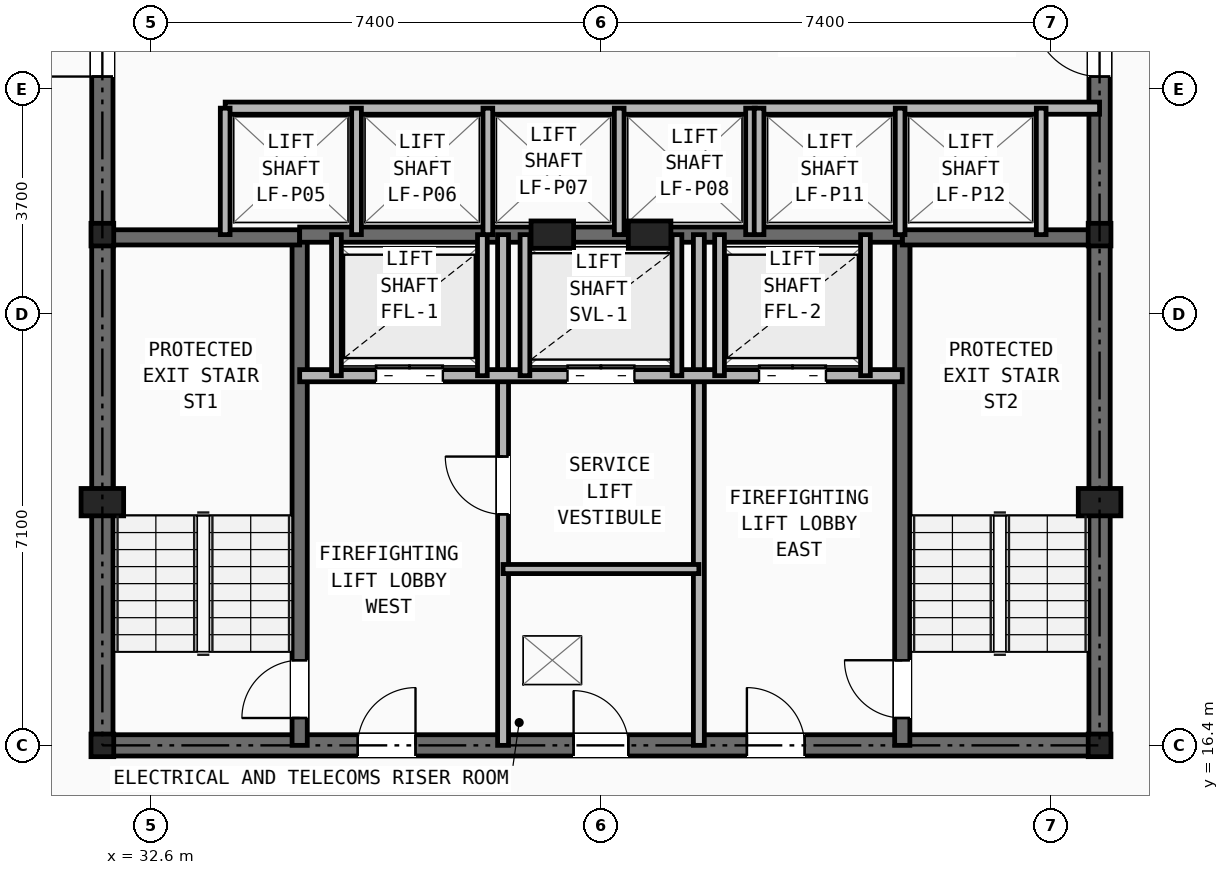
"""IFC4 building model, lengths in metres.
Left out: names, types, materials, properties, quantities, classifications, styles, units other than length and angle.
Written with IfcOpenShell. Run it as: python <this file> out.ifc"""

import sys

from ifc_helpers import new_model, si_unit, direction, frame, frame_2d, origin, origin_2d, place, context, subcontext, project, spatial, rectangle, i_section, extrude, element, fill, save


model = new_model("IFC4")
c1 = context("Model", 3, precision=1e-05, world=origin(), true_north=direction((0.0, 1.0)))
c2 = subcontext(c1, "Body", "Model", "MODEL_VIEW")
j1 = project(units=[si_unit("LENGTHUNIT", "METRE"), si_unit("PLANEANGLEUNIT", "RADIAN")], contexts=[c1])
p1 = place(None, origin())
s1 = spatial("IfcSite", under=j1, at=p1, CompositionType="ELEMENT")
p2 = place(p1, origin())
s2 = spatial("IfcBuilding", under=s1, at=p2, CompositionType="ELEMENT")
p3 = place(p2, frame((0.0, 0.0, 62.4)))
s3 = spatial("IfcBuildingStorey", under=s2, at=p3, CompositionType="ELEMENT", Elevation=62.4)
for number, where, z_axis, x_axis in (
    (1, (31.8, 16.4, 0.0), (0.0, 0.0, 1.0), (1.0, 0.0, 0.0)),
    (2, (48.2, 16.4, 0.0), (0.0, 0.0, 1.0), (1.0, 0.0, 0.0)),
    (3, (31.8, 24.8, 0.0), (0.0, 0.0, 1.0), (1.0, 0.0, 0.0)),
    (4, (48.2, 24.8, 0.0), (0.0, 0.0, 1.0), (1.0, 0.0, 0.0)),
):
    element("IfcColumn", number, at=place(p3, frame(where, z_axis=z_axis, x_axis=x_axis)), inside=s3, PredefinedType="COLUMN", context=c2, shape_type="SweptSolid", body=[
        extrude(i_section(OverallWidth=0.374, OverallDepth=0.372, WebThickness=0.016, FlangeThickness=0.026, at=origin_2d()), origin(), (0.0, 0.0, 1.0), 3.2),
    ])
for number, where, z_axis, x_axis in (
    (5, (31.8, 20.4, 0.0), (0.0, 0.0, 1.0), (1.0, 0.0, 0.0)),
    (6, (48.2, 20.4, 0.0), (0.0, 0.0, 1.0), (1.0, 0.0, 0.0)),
    (7, (39.2, 24.8, 0.0), (0.0, 0.0, 1.0), (1.0, 0.0, 0.0)),
    (8, (40.8, 24.8, 0.0), (0.0, 0.0, 1.0), (1.0, 0.0, 0.0)),
):
    element("IfcColumn", number, at=place(p3, frame(where, z_axis=z_axis, x_axis=x_axis)), inside=s3, PredefinedType="PILASTER", context=c2, shape_type="SweptSolid", body=[
        extrude(rectangle(XDim=0.7, YDim=0.45, at=origin_2d()), origin(), (0.0, 0.0, 1.0), 3.2),
    ])
p4 = place(p3, frame((31.8, 16.4, 0.0), z_axis=(0.0, 0.0, 1.0), x_axis=(1.0, 0.0, 0.0)))
e9 = element("IfcWall", 9, at=p4, inside=s3, PredefinedType="SHEAR", context=c2, shape_type="SweptSolid", body=[
    extrude(rectangle(XDim=16.4, YDim=0.35, at=frame_2d((8.2, 0.0))), origin(), (0.0, 0.0, 1.0), 2.98),
])
p5 = place(p4, frame((7.75, 0.0, 0.0)))
e10 = element("IfcOpeningElement", 10, at=p5, cuts=e9, PredefinedType="OPENING", context=c2, shape_type="SweptSolid", body=[
    extrude(rectangle(XDim=0.9, YDim=2.1, at=frame_2d((0.45, 1.05))), frame((0.0, 0.185, 0.0), z_axis=(0.0, -1.0, 0.0), x_axis=(1.0, 0.0, 0.0)), (0.0, 0.0, 1.0), 0.37),
])
p6 = place(p4, frame((4.2, 0.0, 0.0)))
e11 = element("IfcOpeningElement", 11, at=p6, cuts=e9, PredefinedType="OPENING", context=c2, shape_type="SweptSolid", body=[
    extrude(rectangle(XDim=0.95, YDim=2.1, at=frame_2d((0.475, 1.05))), frame((0.0, 0.185, 0.0), z_axis=(0.0, -1.0, 0.0), x_axis=(1.0, 0.0, 0.0)), (0.0, 0.0, 1.0), 0.37),
])
p7 = place(p4, frame((10.6, 0.0, 0.0)))
e12 = element("IfcOpeningElement", 12, at=p7, cuts=e9, PredefinedType="OPENING", context=c2, shape_type="SweptSolid", body=[
    extrude(rectangle(XDim=0.95, YDim=2.1, at=frame_2d((0.475, 1.05))), frame((0.0, 0.185, 0.0), z_axis=(0.0, -1.0, 0.0), x_axis=(1.0, 0.0, 0.0)), (0.0, 0.0, 1.0), 0.37),
])
p8 = place(p3, frame((31.8, 16.4, 0.0), z_axis=(0.0, 0.0, 1.0), x_axis=(0.0, 1.0, 0.0)))
e13 = element("IfcWall", 13, at=p8, inside=s3, PredefinedType="SHEAR", context=c2, shape_type="SweptSolid", body=[
    extrude(rectangle(XDim=14.8, YDim=0.35, at=frame_2d((7.4, 0.0))), origin(), (0.0, 0.0, 1.0), 2.98),
])
p9 = place(p8, frame((11.0, 0.0, 0.0)))
e14 = element("IfcOpeningElement", 14, at=p9, cuts=e13, PredefinedType="OPENING", context=c2, shape_type="SweptSolid", body=[
    extrude(rectangle(XDim=1.1, YDim=2.15, at=frame_2d((0.55, 1.075))), frame((0.0, 0.185, 0.0), z_axis=(0.0, -1.0, 0.0), x_axis=(1.0, 0.0, 0.0)), (0.0, 0.0, 1.0), 0.37),
])
p10 = place(p3, frame((48.2, 16.4, 0.0), z_axis=(0.0, 0.0, 1.0), x_axis=(0.0, 1.0, 0.0)))
e15 = element("IfcWall", 15, at=p10, inside=s3, PredefinedType="SHEAR", context=c2, shape_type="SweptSolid", body=[
    extrude(rectangle(XDim=14.8, YDim=0.35, at=frame_2d((7.4, 0.0))), origin(), (0.0, 0.0, 1.0), 2.98),
])
p11 = place(p10, frame((11.0, 0.0, 0.0)))
e16 = element("IfcOpeningElement", 16, at=p11, cuts=e15, PredefinedType="OPENING", context=c2, shape_type="SweptSolid", body=[
    extrude(rectangle(XDim=1.1, YDim=2.15, at=frame_2d((0.55, 1.075))), frame((0.0, 0.185, 0.0), z_axis=(0.0, -1.0, 0.0), x_axis=(1.0, 0.0, 0.0)), (0.0, 0.0, 1.0), 0.37),
])
p12 = place(p3, frame((35.045, 16.4, 0.0), z_axis=(0.0, 0.0, 1.0), x_axis=(0.0, 1.0, 0.0)))
e17 = element("IfcWall", 17, at=p12, inside=s3, PredefinedType="SHEAR", context=c2, shape_type="SweptSolid", body=[
    extrude(rectangle(XDim=8.4, YDim=0.25, at=frame_2d((4.2, 0.0))), origin(), (0.0, 0.0, 1.0), 2.98),
])
p13 = place(p12, frame((0.45, 0.0, 0.0)))
e18 = element("IfcOpeningElement", 18, at=p13, cuts=e17, PredefinedType="OPENING", context=c2, shape_type="SweptSolid", body=[
    extrude(rectangle(XDim=0.95, YDim=2.1, at=frame_2d((0.475, 1.05))), frame((0.0, 0.135, 0.0), z_axis=(0.0, -1.0, 0.0), x_axis=(1.0, 0.0, 0.0)), (0.0, 0.0, 1.0), 0.27),
])
p14 = place(p3, frame((31.8, 24.755, 0.0), z_axis=(0.0, 0.0, 1.0), x_axis=(1.0, 0.0, 0.0)))
e19 = element("IfcWall", 19, at=p14, inside=s3, PredefinedType="SHEAR", context=c2, shape_type="SweptSolid", body=[
    extrude(rectangle(XDim=3.245, YDim=0.25, at=frame_2d((1.623, 0.0))), origin(), (0.0, 0.0, 1.0), 2.98),
])
p15 = place(p3, frame((44.955, 16.4, 0.0), z_axis=(0.0, 0.0, 1.0), x_axis=(0.0, 1.0, 0.0)))
e20 = element("IfcWall", 20, at=p15, inside=s3, PredefinedType="SHEAR", context=c2, shape_type="SweptSolid", body=[
    extrude(rectangle(XDim=8.4, YDim=0.25, at=frame_2d((4.2, 0.0))), origin(), (0.0, 0.0, 1.0), 2.98),
])
p16 = place(p15, frame((0.45, 0.0, 0.0)))
e21 = element("IfcOpeningElement", 21, at=p16, cuts=e20, PredefinedType="OPENING", context=c2, shape_type="SweptSolid", body=[
    extrude(rectangle(XDim=0.95, YDim=2.1, at=frame_2d((0.475, 1.05))), frame((0.0, 0.135, 0.0), z_axis=(0.0, -1.0, 0.0), x_axis=(1.0, 0.0, 0.0)), (0.0, 0.0, 1.0), 0.27),
])
p17 = place(p3, frame((44.955, 24.755, 0.0), z_axis=(0.0, 0.0, 1.0), x_axis=(1.0, 0.0, 0.0)))
e22 = element("IfcWall", 22, at=p17, inside=s3, PredefinedType="SHEAR", context=c2, shape_type="SweptSolid", body=[
    extrude(rectangle(XDim=3.245, YDim=0.25, at=frame_2d((1.623, 0.0))), origin(), (0.0, 0.0, 1.0), 2.98),
])
p18 = place(p3, frame((35.045, 24.8, 0.0), z_axis=(0.0, 0.0, 1.0), x_axis=(1.0, 0.0, 0.0)))
e23 = element("IfcWall", 23, at=p18, inside=s3, PredefinedType="SHEAR", context=c2, shape_type="SweptSolid", body=[
    extrude(rectangle(XDim=9.91, YDim=0.25, at=frame_2d((4.955, 0.0))), origin(), (0.0, 0.0, 1.0), 2.98),
])
p19 = place(p3, frame((38.39, 16.4, 0.0), z_axis=(0.0, 0.0, 1.0), x_axis=(0.0, 1.0, 0.0)))
e24 = element("IfcWall", 24, at=p19, inside=s3, PredefinedType="PARTITIONING", context=c2, shape_type="SweptSolid", body=[
    extrude(rectangle(XDim=8.4, YDim=0.18, at=frame_2d((4.2, 0.0))), origin(), (0.0, 0.0, 1.0), 2.431),
])
p20 = place(p19, frame((3.8, 0.0, 0.0)))
e25 = element("IfcOpeningElement", 25, at=p20, cuts=e24, PredefinedType="OPENING", context=c2, shape_type="SweptSolid", body=[
    extrude(rectangle(XDim=0.95, YDim=2.1, at=frame_2d((0.475, 1.05))), frame((0.0, 0.1, 0.0), z_axis=(0.0, -1.0, 0.0), x_axis=(1.0, 0.0, 0.0)), (0.0, 0.0, 1.0), 0.2),
])
p21 = place(p3, frame((41.61, 16.4, 0.0), z_axis=(0.0, 0.0, 1.0), x_axis=(0.0, 1.0, 0.0)))
e26 = element("IfcWall", 26, at=p21, inside=s3, PredefinedType="PARTITIONING", context=c2, shape_type="SweptSolid", body=[
    extrude(rectangle(XDim=8.4, YDim=0.18, at=frame_2d((4.2, 0.0))), origin(), (0.0, 0.0, 1.0), 2.431),
])
p22 = place(p3, frame((35.045, 22.48, 0.0), z_axis=(0.0, 0.0, 1.0), x_axis=(1.0, 0.0, 0.0)))
e27 = element("IfcWall", 27, at=p22, inside=s3, PredefinedType="SOLIDWALL", context=c2, shape_type="SweptSolid", body=[
    extrude(rectangle(XDim=9.91, YDim=0.2, at=frame_2d((4.955, 0.0))), origin(), (0.0, 0.0, 1.0), 2.98),
])
p23 = place(p22, frame((1.255, 0.0, 0.0)))
e28 = element("IfcOpeningElement", 28, at=p23, cuts=e27, PredefinedType="OPENING", context=c2, shape_type="SweptSolid", body=[
    extrude(rectangle(XDim=1.1, YDim=2.15, at=frame_2d((0.55, 1.075))), frame((0.0, 0.11, 0.0), z_axis=(0.0, -1.0, 0.0), x_axis=(1.0, 0.0, 0.0)), (0.0, 0.0, 1.0), 0.22),
])
p24 = place(p22, frame((7.555, 0.0, 0.0)))
e29 = element("IfcOpeningElement", 29, at=p24, cuts=e27, PredefinedType="OPENING", context=c2, shape_type="SweptSolid", body=[
    extrude(rectangle(XDim=1.1, YDim=2.15, at=frame_2d((0.55, 1.075))), frame((0.0, 0.11, 0.0), z_axis=(0.0, -1.0, 0.0), x_axis=(1.0, 0.0, 0.0)), (0.0, 0.0, 1.0), 0.22),
])
p25 = place(p22, frame((4.405, 0.0, 0.0)))
e30 = element("IfcOpeningElement", 30, at=p25, cuts=e27, PredefinedType="OPENING", context=c2, shape_type="SweptSolid", body=[
    extrude(rectangle(XDim=1.1, YDim=2.15, at=frame_2d((0.55, 1.075))), frame((0.0, 0.11, 0.0), z_axis=(0.0, -1.0, 0.0), x_axis=(1.0, 0.0, 0.0)), (0.0, 0.0, 1.0), 0.22),
])
p26 = place(p3, frame((38.39, 19.3, 0.0), z_axis=(0.0, 0.0, 1.0), x_axis=(1.0, 0.0, 0.0)))
e31 = element("IfcWall", 31, at=p26, inside=s3, PredefinedType="PARTITIONING", context=c2, shape_type="SweptSolid", body=[
    extrude(rectangle(XDim=3.22, YDim=0.15, at=frame_2d((1.61, 0.0))), origin(), (0.0, 0.0, 1.0), 2.98),
])
for number, where, z_axis, x_axis in (
    (32, (35.65, 22.48, 0.0), (0.0, 0.0, 1.0), (0.0, 1.0, 0.0)),
    (33, (38.05, 22.48, 0.0), (0.0, 0.0, 1.0), (0.0, 1.0, 0.0)),
    (34, (41.95, 22.48, 0.0), (0.0, 0.0, 1.0), (0.0, 1.0, 0.0)),
    (35, (44.35, 22.48, 0.0), (0.0, 0.0, 1.0), (0.0, 1.0, 0.0)),
    (36, (38.75, 22.48, 0.0), (0.0, 0.0, 1.0), (0.0, 1.0, 0.0)),
    (37, (41.25, 22.48, 0.0), (0.0, 0.0, 1.0), (0.0, 1.0, 0.0)),
):
    element("IfcWall", number, at=place(p3, frame(where, z_axis=z_axis, x_axis=x_axis)), inside=s3, PredefinedType="SOLIDWALL", context=c2, shape_type="SweptSolid", body=[
        extrude(rectangle(XDim=2.32, YDim=0.16, at=frame_2d((1.16, 0.0))), origin(), (0.0, 0.0, 1.0), 2.98),
    ])
p27 = place(p3, frame((33.82, 26.88, 0.0), z_axis=(0.0, 0.0, 1.0), x_axis=(1.0, 0.0, 0.0)))
e38 = element("IfcWall", 38, at=p27, inside=s3, PredefinedType="SOLIDWALL", context=c2, shape_type="SweptSolid", body=[
    extrude(rectangle(XDim=14.38, YDim=0.2, at=frame_2d((7.19, 0.0))), origin(), (0.0, 0.0, 1.0), 2.431),
])
for number, where, z_axis, x_axis in (
    (39, (33.82, 24.8, 0.0), (0.0, 0.0, 1.0), (0.0, 1.0, 0.0)),
    (40, (35.98, 24.8, 0.0), (0.0, 0.0, 1.0), (0.0, 1.0, 0.0)),
    (41, (38.14, 24.8, 0.0), (0.0, 0.0, 1.0), (0.0, 1.0, 0.0)),
    (42, (40.3, 24.8, 0.0), (0.0, 0.0, 1.0), (0.0, 1.0, 0.0)),
    (43, (42.46, 24.8, 0.0), (0.0, 0.0, 1.0), (0.0, 1.0, 0.0)),
    (44, (42.6, 24.8, 0.0), (0.0, 0.0, 1.0), (0.0, 1.0, 0.0)),
    (45, (44.92, 24.8, 0.0), (0.0, 0.0, 1.0), (0.0, 1.0, 0.0)),
    (46, (47.24, 24.8, 0.0), (0.0, 0.0, 1.0), (0.0, 1.0, 0.0)),
):
    element("IfcWall", number, at=place(p3, frame(where, z_axis=z_axis, x_axis=x_axis)), inside=s3, PredefinedType="SOLIDWALL", context=c2, shape_type="SweptSolid", body=[
        extrude(rectangle(XDim=2.08, YDim=0.16, at=frame_2d((1.04, 0.0))), origin(), (0.0, 0.0, 1.0), 2.98),
    ])
p28 = place(p5, origin())
e47 = element("IfcDoor", 47, at=p28, inside=s3, OperationType="SINGLE_SWING_LEFT", PredefinedType="DOOR", context=c2, shape_type="SweptSolid", body=[
    extrude(rectangle(XDim=0.9, YDim=2.1, at=frame_2d((0.45, 1.05))), frame((0.0, 0.025, 0.0), z_axis=(0.0, -1.0, 0.0), x_axis=(1.0, 0.0, 0.0)), (0.0, 0.0, 1.0), 0.05),
])
fill(e10, e47)
p29 = place(p20, origin())
e48 = element("IfcDoor", 48, at=p29, inside=s3, OperationType="SINGLE_SWING_RIGHT", PredefinedType="DOOR", context=c2, shape_type="SweptSolid", body=[
    extrude(rectangle(XDim=0.95, YDim=2.1, at=frame_2d((0.475, 1.05))), frame((0.0, 0.025, 0.0), z_axis=(0.0, -1.0, 0.0), x_axis=(1.0, 0.0, 0.0)), (0.0, 0.0, 1.0), 0.05),
])
fill(e25, e48)
p30 = place(p13, origin())
e49 = element("IfcDoor", 49, at=p30, inside=s3, OperationType="SINGLE_SWING_LEFT", PredefinedType="DOOR", context=c2, shape_type="SweptSolid", body=[
    extrude(rectangle(XDim=0.95, YDim=2.1, at=frame_2d((0.475, 1.05))), frame((0.0, 0.025, 0.0), z_axis=(0.0, -1.0, 0.0), x_axis=(1.0, 0.0, 0.0)), (0.0, 0.0, 1.0), 0.05),
])
fill(e18, e49)
p31 = place(p16, origin())
e50 = element("IfcDoor", 50, at=p31, inside=s3, OperationType="SINGLE_SWING_RIGHT", PredefinedType="DOOR", context=c2, shape_type="SweptSolid", body=[
    extrude(rectangle(XDim=0.95, YDim=2.1, at=frame_2d((0.475, 1.05))), frame((0.0, 0.025, 0.0), z_axis=(0.0, -1.0, 0.0), x_axis=(1.0, 0.0, 0.0)), (0.0, 0.0, 1.0), 0.05),
])
fill(e21, e50)
p32 = place(p6, origin())
e51 = element("IfcDoor", 51, at=p32, inside=s3, OperationType="SINGLE_SWING_RIGHT", PredefinedType="DOOR", context=c2, shape_type="SweptSolid", body=[
    extrude(rectangle(XDim=0.95, YDim=2.1, at=frame_2d((0.475, 1.05))), frame((0.0, 0.025, 0.0), z_axis=(0.0, -1.0, 0.0), x_axis=(1.0, 0.0, 0.0)), (0.0, 0.0, 1.0), 0.05),
])
fill(e11, e51)
p33 = place(p7, origin())
e52 = element("IfcDoor", 52, at=p33, inside=s3, OperationType="SINGLE_SWING_LEFT", PredefinedType="DOOR", context=c2, shape_type="SweptSolid", body=[
    extrude(rectangle(XDim=0.95, YDim=2.1, at=frame_2d((0.475, 1.05))), frame((0.0, 0.025, 0.0), z_axis=(0.0, -1.0, 0.0), x_axis=(1.0, 0.0, 0.0)), (0.0, 0.0, 1.0), 0.05),
])
fill(e12, e52)
p34 = place(p23, origin())
e53 = element("IfcDoor", 53, at=p34, inside=s3, OperationType="DOUBLE_DOOR_SLIDING", PredefinedType="DOOR", context=c2, shape_type="SweptSolid", body=[
    extrude(rectangle(XDim=1.1, YDim=2.15, at=frame_2d((0.55, 1.075))), frame((0.0, 0.025, 0.0), z_axis=(0.0, -1.0, 0.0), x_axis=(1.0, 0.0, 0.0)), (0.0, 0.0, 1.0), 0.05),
])
fill(e28, e53)
p35 = place(p24, origin())
e54 = element("IfcDoor", 54, at=p35, inside=s3, OperationType="DOUBLE_DOOR_SLIDING", PredefinedType="DOOR", context=c2, shape_type="SweptSolid", body=[
    extrude(rectangle(XDim=1.1, YDim=2.15, at=frame_2d((0.55, 1.075))), frame((0.0, 0.025, 0.0), z_axis=(0.0, -1.0, 0.0), x_axis=(1.0, 0.0, 0.0)), (0.0, 0.0, 1.0), 0.05),
])
fill(e29, e54)
p36 = place(p25, origin())
e55 = element("IfcDoor", 55, at=p36, inside=s3, OperationType="DOUBLE_DOOR_SLIDING", PredefinedType="DOOR", context=c2, shape_type="SweptSolid", body=[
    extrude(rectangle(XDim=1.1, YDim=2.15, at=frame_2d((0.55, 1.075))), frame((0.0, 0.025, 0.0), z_axis=(0.0, -1.0, 0.0), x_axis=(1.0, 0.0, 0.0)), (0.0, 0.0, 1.0), 0.05),
])
fill(e30, e55)
p37 = place(p9, origin())
e56 = element("IfcDoor", 56, at=p37, inside=s3, OperationType="SINGLE_SWING_LEFT", PredefinedType="DOOR", context=c2, shape_type="SweptSolid", body=[
    extrude(rectangle(XDim=1.1, YDim=2.15, at=frame_2d((0.55, 1.075))), frame((0.0, 0.025, 0.0), z_axis=(0.0, -1.0, 0.0), x_axis=(1.0, 0.0, 0.0)), (0.0, 0.0, 1.0), 0.05),
])
fill(e14, e56)
p38 = place(p11, origin())
e57 = element("IfcDoor", 57, at=p38, inside=s3, OperationType="SINGLE_SWING_RIGHT", PredefinedType="DOOR", context=c2, shape_type="SweptSolid", body=[
    extrude(rectangle(XDim=1.1, YDim=2.15, at=frame_2d((0.55, 1.075))), frame((0.0, 0.025, 0.0), z_axis=(0.0, -1.0, 0.0), x_axis=(1.0, 0.0, 0.0)), (0.0, 0.0, 1.0), 0.05),
])
fill(e16, e57)
save(model, sys.argv[1])
